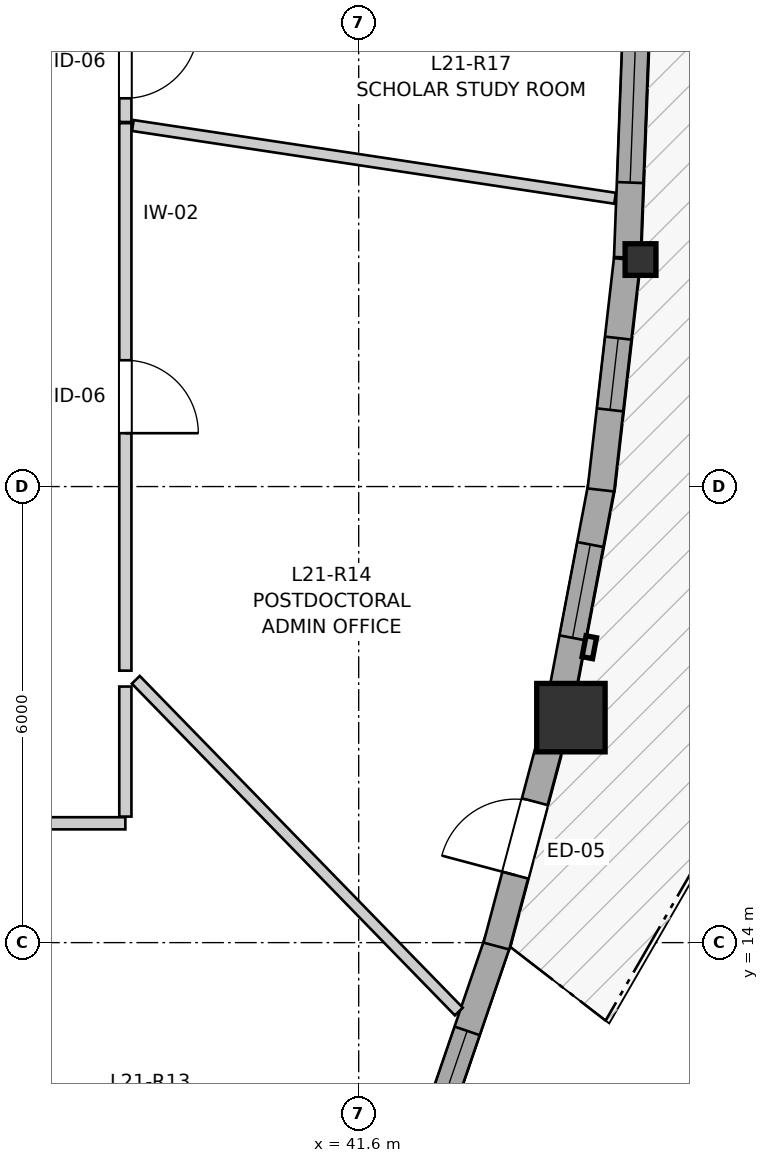
"""IFC4 building model, lengths in metres.
Left out: names, types, materials, properties, quantities, classifications, styles, units other than length and angle.
Written with IfcOpenShell. Run it as: python <this file> out.ifc"""

import sys

from ifc_helpers import new_model, si_unit, direction, frame, frame_2d, origin, origin_2d, place, context, subcontext, project, spatial, rectangle, i_section, extrude, source, transform, mapped, element, fill, save


model = new_model("IFC4")
c1 = context("Model", 3, precision=1e-05, world=origin(), true_north=direction((0.0, 1.0)))
c2 = subcontext(c1, "Body", "Model", "MODEL_VIEW")
j1 = project(units=[si_unit("LENGTHUNIT", "METRE"), si_unit("PLANEANGLEUNIT", "RADIAN")], contexts=[c1])
p1 = place(None, origin())
s1 = spatial("IfcSite", under=j1, at=p1, CompositionType="ELEMENT")
p2 = place(p1, origin())
s2 = spatial("IfcBuilding", under=s1, at=p2, CompositionType="ELEMENT")
p3 = place(p2, frame((0.0, 0.0, 73.6)))
s3 = spatial("IfcBuildingStorey", under=s2, at=p3, CompositionType="ELEMENT", Elevation=73.6)
m1 = source(origin(), c2, "Body", "SweptSolid", [
    extrude(rectangle(XDim=0.9, YDim=0.9, at=origin_2d()), origin(), (0.0, 0.0, 1.0), 2.95),
])
p4 = place(p3, frame((44.392, 16.96, 0.0), z_axis=(0.0, 0.0, 1.0), x_axis=(1.0, 0.0, 0.0)))
e1 = element("IfcColumn", 1, at=p4, inside=s3, PredefinedType="COLUMN", context=c2, shape_type="MappedRepresentation", body=[
    mapped(m1, transform((0.0, 0.0, 0.0), x_axis=(1.0, 0.0, 0.0), y_axis=(0.0, 1.0, 0.0), z_axis=(0.0, 0.0, 1.0), scale=1.0)),
])
m2 = source(origin(), c2, "Body", "SweptSolid", [
    extrude(i_section(OverallWidth=0.406, OverallDepth=0.416, WebThickness=0.027, FlangeThickness=0.044, FilletRadius=0.015, at=origin_2d()), origin(), (0.0, 0.0, 1.0), 2.95),
])
p5 = place(p3, frame((45.308, 22.987, 0.0), z_axis=(0.0, 0.0, 1.0), x_axis=(1.0, 0.0, 0.0)))
e2 = element("IfcColumn", 2, at=p5, inside=s3, PredefinedType="PILASTER", context=c2, shape_type="MappedRepresentation", body=[
    mapped(m2, transform((0.0, 0.0, 0.0), x_axis=(1.0, 0.0, 0.0), y_axis=(0.0, 1.0, 0.0), z_axis=(0.0, 0.0, 1.0), scale=1.0)),
])
p6 = place(p3, frame((42.401, 11.009, 0.0), z_axis=(0.0, 0.0, 1.0), x_axis=(0.323605065536, 0.946192243447, 0.0)))
e3 = element("IfcWall", 3, at=p6, inside=s3, PredefinedType="SOLIDWALL", context=c2, shape_type="SweptSolid", body=[
    extrude(rectangle(XDim=3.203, YDim=0.35, at=frame_2d((1.601, 0.0))), origin(), (0.0, 0.0, 1.0), 2.48),
])
p7 = place(p6, frame((0.334, 0.0, 0.82)))
e4 = element("IfcOpeningElement", 4, at=p7, cuts=e3, PredefinedType="OPENING", context=c2, shape_type="SweptSolid", body=[
    extrude(rectangle(XDim=1.6, YDim=1.35, at=frame_2d((0.8, 0.675))), frame((0.0, 0.185, 0.0), z_axis=(0.0, -1.0, 0.0), x_axis=(1.0, 0.0, 0.0)), (0.0, 0.0, 1.0), 0.37),
])
p8 = place(p3, frame((43.412, 13.955, 0.0), z_axis=(0.0, 0.0, 1.0), x_axis=(0.257050841376, 0.966397881283, 0.0)))
e5 = element("IfcWall", 5, at=p8, inside=s3, PredefinedType="SOLIDWALL", context=c2, shape_type="SweptSolid", body=[
    extrude(rectangle(XDim=2.931, YDim=0.35, at=frame_2d((1.465, 0.0))), origin(), (0.0, 0.0, 1.0), 2.48),
])
p9 = place(p8, frame((0.966, 0.0, 0.0)))
e6 = element("IfcOpeningElement", 6, at=p9, cuts=e5, PredefinedType="OPENING", context=c2, shape_type="SweptSolid", body=[
    extrude(rectangle(XDim=1.0, YDim=2.1, at=frame_2d((0.5, 1.05))), frame((0.0, 0.185, 0.0), z_axis=(0.0, -1.0, 0.0), x_axis=(1.0, 0.0, 0.0)), (0.0, 0.0, 1.0), 0.37),
])
p10 = place(p3, frame((44.262, 17.214, 0.0), z_axis=(0.0, 0.0, 1.0), x_axis=(0.18665246466, 0.982426006087, 0.0)))
e7 = element("IfcWall", 7, at=p10, inside=s3, PredefinedType="SOLIDWALL", context=c2, shape_type="SweptSolid", body=[
    extrude(rectangle(XDim=2.88, YDim=0.35, at=frame_2d((1.44, 0.0))), origin(), (0.0, 0.0, 1.0), 2.48),
])
p11 = place(p10, frame((0.81, 0.0, 0.82)))
e8 = element("IfcOpeningElement", 8, at=p11, cuts=e7, PredefinedType="OPENING", context=c2, shape_type="SweptSolid", body=[
    extrude(rectangle(XDim=1.25, YDim=1.35, at=frame_2d((0.625, 0.675))), frame((0.0, 0.185, 0.0), z_axis=(0.0, -1.0, 0.0), x_axis=(1.0, 0.0, 0.0)), (0.0, 0.0, 1.0), 0.37),
])
p12 = place(p3, frame((44.787, 19.955, 0.0), z_axis=(0.0, 0.0, 1.0), x_axis=(0.113232876367, 0.993568475602, 0.0)))
e9 = element("IfcWall", 9, at=p12, inside=s3, PredefinedType="SOLIDWALL", context=c2, shape_type="SweptSolid", body=[
    extrude(rectangle(XDim=3.051, YDim=0.35, at=frame_2d((1.525, 0.0))), origin(), (0.0, 0.0, 1.0), 2.48),
])
p13 = place(p12, frame((1.06, 0.0, 0.82)))
e10 = element("IfcOpeningElement", 10, at=p13, cuts=e9, PredefinedType="OPENING", context=c2, shape_type="SweptSolid", body=[
    extrude(rectangle(XDim=0.95, YDim=1.35, at=frame_2d((0.475, 0.675))), frame((0.0, 0.185, 0.0), z_axis=(0.0, -1.0, 0.0), x_axis=(1.0, 0.0, 0.0)), (0.0, 0.0, 1.0), 0.37),
])
p14 = place(p3, frame((45.134, 23.013, 0.0), z_axis=(0.0, 0.0, 1.0), x_axis=(0.037984969205, 0.999278310639, 0.0)))
e11 = element("IfcWall", 11, at=p14, inside=s3, PredefinedType="SOLIDWALL", context=c2, shape_type="SweptSolid", body=[
    extrude(rectangle(XDim=3.034, YDim=0.35, at=frame_2d((1.517, 0.0))), origin(), (0.0, 0.0, 1.0), 2.48),
])
p15 = place(p14, frame((0.987, 0.0, 0.82)))
e12 = element("IfcOpeningElement", 12, at=p15, cuts=e11, PredefinedType="OPENING", context=c2, shape_type="SweptSolid", body=[
    extrude(rectangle(XDim=1.75, YDim=1.3, at=frame_2d((0.875, 0.65))), frame((0.0, 0.185, 0.0), z_axis=(0.0, -1.0, 0.0), x_axis=(1.0, 0.0, 0.0)), (0.0, 0.0, 1.0), 0.37),
])
p16 = place(p3, frame((38.53, 24.781, 0.0), z_axis=(0.0, 0.0, 1.0), x_axis=(0.0, -1.0, 0.0)))
e13 = element("IfcWall", 13, at=p16, inside=s3, PredefinedType="PARTITIONING", context=c2, shape_type="SweptSolid", body=[
    extrude(rectangle(XDim=7.203, YDim=0.16, at=frame_2d((3.602, 0.0))), origin(), (0.0, 0.0, 1.0), 2.95),
])
p17 = place(p16, frame((3.119, 0.0, 0.0)))
e14 = element("IfcOpeningElement", 14, at=p17, cuts=e13, PredefinedType="OPENING", context=c2, shape_type="SweptSolid", body=[
    extrude(rectangle(XDim=0.96, YDim=2.1, at=frame_2d((0.48, 1.05))), frame((0.0, 0.09, 0.0), z_axis=(0.0, -1.0, 0.0), x_axis=(1.0, 0.0, 0.0)), (0.0, 0.0, 1.0), 0.18),
])
p18 = place(p3, frame((38.53, 15.57, 0.0), z_axis=(0.0, 0.0, 1.0), x_axis=(-1.0, 0.0, 0.0)))
e15 = element("IfcWall", 15, at=p18, inside=s3, PredefinedType="PARTITIONING", context=c2, shape_type="SweptSolid", body=[
    extrude(rectangle(XDim=4.412, YDim=0.16, at=frame_2d((2.206, 0.0))), origin(), (0.0, 0.0, 1.0), 2.95),
])
p19 = place(p18, frame((1.718, 0.0, 0.0)))
e16 = element("IfcOpeningElement", 16, at=p19, cuts=e15, PredefinedType="OPENING", context=c2, shape_type="SweptSolid", body=[
    extrude(rectangle(XDim=0.96, YDim=2.1, at=frame_2d((0.48, 1.05))), frame((0.0, 0.09, 0.0), z_axis=(0.0, -1.0, 0.0), x_axis=(1.0, 0.0, 0.0)), (0.0, 0.0, 1.0), 0.18),
])
p20 = place(p3, frame((38.53, 26.381, 0.0), z_axis=(0.0, 0.0, 1.0), x_axis=(0.0, -1.0, 0.0)))
e17 = element("IfcWall", 17, at=p20, inside=s3, PredefinedType="PARTITIONING", context=c2, shape_type="SweptSolid", body=[
    extrude(rectangle(XDim=1.585, YDim=0.16, at=frame_2d((0.792, 0.0))), origin(), (0.0, 0.0, 1.0), 2.95),
])
p21 = place(p20, frame((0.313, 0.0, 0.0)))
e18 = element("IfcOpeningElement", 18, at=p21, cuts=e17, PredefinedType="OPENING", context=c2, shape_type="SweptSolid", body=[
    extrude(rectangle(XDim=0.96, YDim=2.1, at=frame_2d((0.48, 1.05))), frame((0.0, 0.09, 0.0), z_axis=(0.0, -1.0, 0.0), x_axis=(1.0, 0.0, 0.0)), (0.0, 0.0, 1.0), 0.18),
])
p22 = place(p3, frame((34.175, 15.458, 0.0), z_axis=(0.0, 0.0, 1.0), x_axis=(0.341079223998, -0.940034554129, 0.0)))
e19 = element("IfcWall", 19, at=p22, inside=s3, PredefinedType="PARTITIONING", context=c2, shape_type="SweptSolid", body=[
    extrude(rectangle(XDim=10.484, YDim=0.145, at=frame_2d((5.242, 0.0))), origin(), (0.0, 0.0, 1.0), 2.95),
])
p23 = place(p3, frame((38.629, 24.75, 0.0), z_axis=(0.0, 0.0, 1.0), x_axis=(0.988806184902, -0.149205659073, 0.0)))
e20 = element("IfcWall", 20, at=p23, inside=s3, PredefinedType="PARTITIONING", context=c2, shape_type="SweptSolid", body=[
    extrude(rectangle(XDim=6.416, YDim=0.145, at=frame_2d((3.208, 0.0))), origin(), (0.0, 0.0, 1.0), 2.95),
])
p24 = place(p3, frame((38.667, 17.458, 0.0), z_axis=(0.0, 0.0, 1.0), x_axis=(0.697626427609, -0.716461699954, 0.0)))
e21 = element("IfcWall", 21, at=p24, inside=s3, PredefinedType="PARTITIONING", context=c2, shape_type="SweptSolid", body=[
    extrude(rectangle(XDim=6.092, YDim=0.145, at=frame_2d((3.046, 0.0))), origin(), (0.0, 0.0, 1.0), 2.95),
])
p25 = place(p3, frame((38.53, 15.658, 0.0), z_axis=(0.0, 0.0, 1.0), x_axis=(0.0, 1.0, 0.0)))
e22 = element("IfcWall", 22, at=p25, inside=s3, PredefinedType="PARTITIONING", context=c2, shape_type="SweptSolid", body=[
    extrude(rectangle(XDim=1.711, YDim=0.16, at=frame_2d((0.855, 0.0))), origin(), (0.0, 0.0, 1.0), 2.95),
])
m3 = source(origin(), c2, "Body", "SweptSolid", [
    extrude(rectangle(XDim=1.6, YDim=1.35, at=frame_2d((0.8, 0.675))), frame((0.0, 0.03, 0.0), z_axis=(0.0, -1.0, 0.0), x_axis=(1.0, 0.0, 0.0)), (0.0, 0.0, 1.0), 0.06),
])
p26 = place(p7, origin())
e23 = element("IfcWindow", 23, at=p26, inside=s3, PartitioningType="SINGLE_PANEL", PredefinedType="WINDOW", context=c2, shape_type="MappedRepresentation", body=[
    mapped(m3, transform((0.0, 0.0, 0.0), x_axis=(1.0, 0.0, 0.0), y_axis=(0.0, 1.0, 0.0), z_axis=(0.0, 0.0, 1.0), scale=1.0)),
])
fill(e4, e23)
m4 = source(origin(), c2, "Body", "SweptSolid", [
    extrude(rectangle(XDim=1.25, YDim=1.35, at=frame_2d((0.625, 0.675))), frame((0.0, 0.03, 0.0), z_axis=(0.0, -1.0, 0.0), x_axis=(1.0, 0.0, 0.0)), (0.0, 0.0, 1.0), 0.06),
])
p27 = place(p11, origin())
e24 = element("IfcWindow", 24, at=p27, inside=s3, PartitioningType="SINGLE_PANEL", PredefinedType="WINDOW", context=c2, shape_type="MappedRepresentation", body=[
    mapped(m4, transform((0.0, 0.0, 0.0), x_axis=(1.0, 0.0, 0.0), y_axis=(0.0, 1.0, 0.0), z_axis=(0.0, 0.0, 1.0), scale=1.0)),
])
fill(e8, e24)
m5 = source(origin(), c2, "Body", "SweptSolid", [
    extrude(rectangle(XDim=0.95, YDim=1.35, at=frame_2d((0.475, 0.675))), frame((0.0, 0.03, 0.0), z_axis=(0.0, -1.0, 0.0), x_axis=(1.0, 0.0, 0.0)), (0.0, 0.0, 1.0), 0.06),
])
p28 = place(p13, origin())
e25 = element("IfcWindow", 25, at=p28, inside=s3, PartitioningType="SINGLE_PANEL", PredefinedType="WINDOW", context=c2, shape_type="MappedRepresentation", body=[
    mapped(m5, transform((0.0, 0.0, 0.0), x_axis=(1.0, 0.0, 0.0), y_axis=(0.0, 1.0, 0.0), z_axis=(0.0, 0.0, 1.0), scale=1.0)),
])
fill(e10, e25)
m6 = source(origin(), c2, "Body", "SweptSolid", [
    extrude(rectangle(XDim=1.75, YDim=1.3, at=frame_2d((0.875, 0.65))), frame((0.0, 0.03, 0.0), z_axis=(0.0, -1.0, 0.0), x_axis=(1.0, 0.0, 0.0)), (0.0, 0.0, 1.0), 0.06),
])
p29 = place(p15, origin())
e26 = element("IfcWindow", 26, at=p29, inside=s3, PartitioningType="SINGLE_PANEL", PredefinedType="WINDOW", context=c2, shape_type="MappedRepresentation", body=[
    mapped(m6, transform((0.0, 0.0, 0.0), x_axis=(1.0, 0.0, 0.0), y_axis=(0.0, 1.0, 0.0), z_axis=(0.0, 0.0, 1.0), scale=1.0)),
])
fill(e12, e26)
m7 = source(origin(), c2, "Body", "SweptSolid", [
    extrude(rectangle(XDim=1.0, YDim=2.1, at=frame_2d((0.5, 1.05))), frame((0.0, 0.025, 0.0), z_axis=(0.0, -1.0, 0.0), x_axis=(1.0, 0.0, 0.0)), (0.0, 0.0, 1.0), 0.05),
])
p30 = place(p9, origin())
e27 = element("IfcDoor", 27, at=p30, inside=s3, OperationType="SINGLE_SWING_LEFT", PredefinedType="DOOR", context=c2, shape_type="MappedRepresentation", body=[
    mapped(m7, transform((0.0, 0.0, 0.0), x_axis=(1.0, 0.0, 0.0), y_axis=(0.0, 1.0, 0.0), z_axis=(0.0, 0.0, 1.0), scale=1.0)),
])
fill(e6, e27)
m8 = source(origin(), c2, "Body", "SweptSolid", [
    extrude(rectangle(XDim=0.96, YDim=2.1, at=frame_2d((0.48, 1.05))), frame((0.0, 0.025, 0.0), z_axis=(0.0, -1.0, 0.0), x_axis=(1.0, 0.0, 0.0)), (0.0, 0.0, 1.0), 0.05),
])
p31 = place(p17, origin())
e28 = element("IfcDoor", 28, at=p31, inside=s3, OperationType="SINGLE_SWING_RIGHT", PredefinedType="DOOR", context=c2, shape_type="MappedRepresentation", body=[
    mapped(m8, transform((0.0, 0.0, 0.0), x_axis=(1.0, 0.0, 0.0), y_axis=(0.0, 1.0, 0.0), z_axis=(0.0, 0.0, 1.0), scale=1.0)),
])
fill(e14, e28)
p32 = place(p21, origin())
e29 = element("IfcDoor", 29, at=p32, inside=s3, OperationType="SINGLE_SWING_LEFT", PredefinedType="DOOR", context=c2, shape_type="MappedRepresentation", body=[
    mapped(m8, transform((0.0, 0.0, 0.0), x_axis=(1.0, 0.0, 0.0), y_axis=(0.0, 1.0, 0.0), z_axis=(0.0, 0.0, 1.0), scale=1.0)),
])
fill(e18, e29)
save(model, sys.argv[1])
